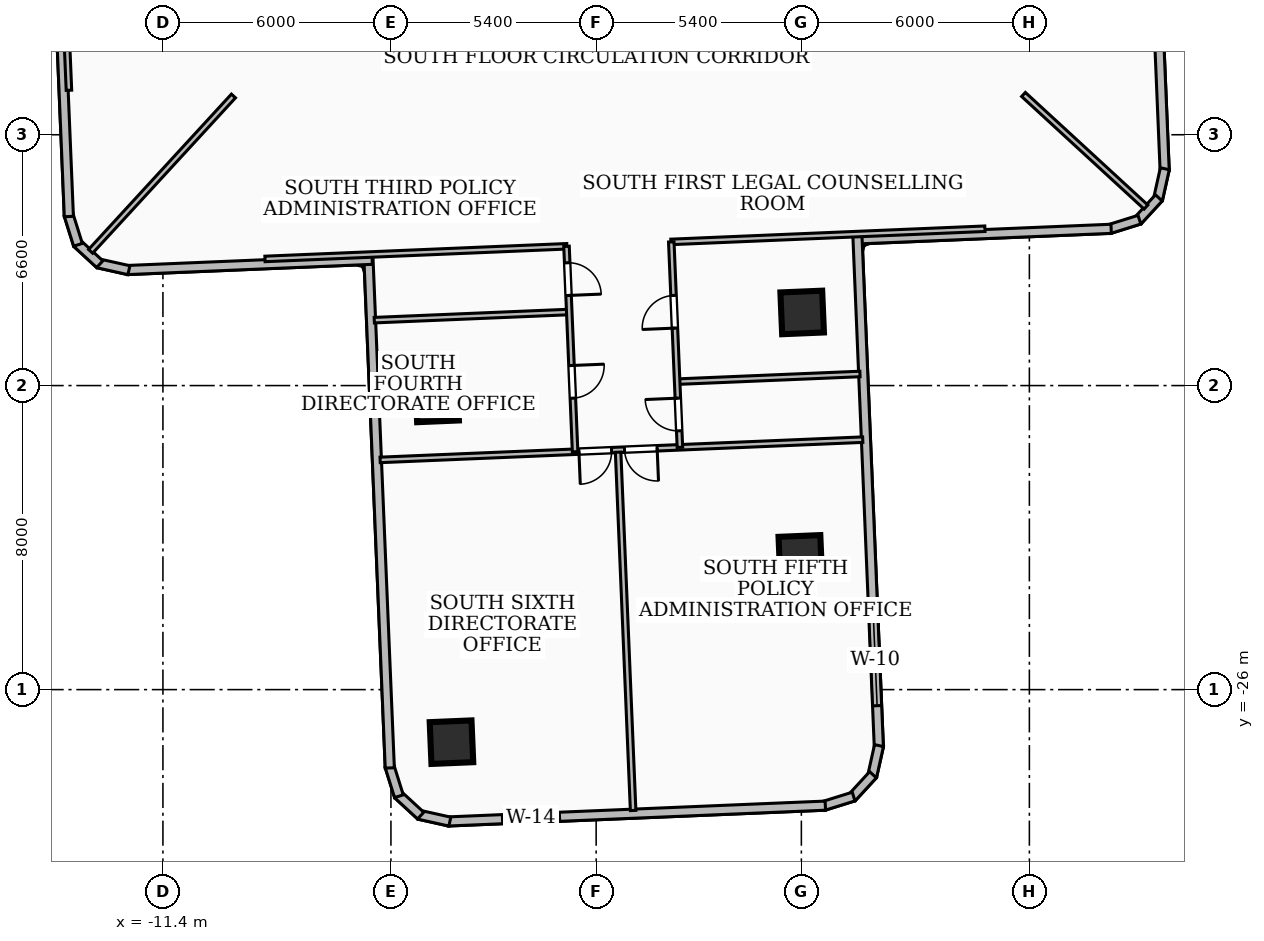
"""IFC4 building model, lengths in metres.
Left out: names, types, materials, properties, quantities, classifications, styles, units other than length and angle.
Written with IfcOpenShell. Run it as: python <this file> out.ifc"""

import sys

from ifc_helpers import new_model, si_unit, direction, frame, frame_2d, origin, origin_2d, place, context, subcontext, project, spatial, rectangle, extrude, element, fill, save


model = new_model("IFC4")
c1 = context("Model", 3, precision=1e-05, world=origin(), true_north=direction((0.0, 1.0)))
c2 = subcontext(c1, "Body", "Model", "MODEL_VIEW")
j1 = project(units=[si_unit("LENGTHUNIT", "METRE"), si_unit("PLANEANGLEUNIT", "RADIAN")], contexts=[c1])
p1 = place(None, origin())
s1 = spatial("IfcSite", under=j1, at=p1, CompositionType="ELEMENT")
p2 = place(p1, origin())
s2 = spatial("IfcBuilding", under=s1, at=p2, CompositionType="ELEMENT")
p3 = place(p2, frame((0.0, 0.0, 42.48)))
s3 = spatial("IfcBuildingStorey", under=s2, at=p3, CompositionType="ELEMENT", Elevation=42.48)
for number, where, z_axis, x_axis in (
    (1, (-4.184, -18.391, 0.0), (0.0, 0.0, 1.0), (0.999, 0.042, 0.0)),
    (2, (5.421, -16.076, 0.0), (0.0, 0.0, 1.0), (0.999, 0.042, 0.0)),
    (3, (-3.807, -27.383, 0.0), (0.0, 0.0, 1.0), (0.999, 0.042, 0.0)),
    (4, (5.372, -22.507, 0.0), (0.0, 0.0, 1.0), (0.999, 0.042, 0.0)),
):
    element("IfcColumn", number, at=place(p3, frame(where, z_axis=z_axis, x_axis=x_axis)), inside=s3, PredefinedType="COLUMN", context=c2, shape_type="SweptSolid", body=[
        extrude(rectangle(XDim=1.1, YDim=1.1, at=origin_2d()), origin(), (0.0, 0.0, 1.0), 3.6),
    ])
p4 = place(p3, frame((14.69, -5.894, 0.0), z_axis=(0.0, 0.0, 1.0), x_axis=(0.041827173477, -0.999124860845, 0.0)))
e5 = element("IfcWall", 5, at=p4, inside=s3, PredefinedType="SOLIDWALL", context=c2, shape_type="SweptSolid", body=[
    extrude(rectangle(XDim=6.456, YDim=0.24, at=frame_2d((3.228, 0.0))), origin(), (0.0, 0.0, 1.0), 3.34),
])
p5 = place(p3, frame((14.964, -12.295, 0.0), z_axis=(0.0, 0.0, 1.0), x_axis=(-0.21736704137, -0.976089939158, 0.0)))
e6 = element("IfcWall", 6, at=p5, inside=s3, PredefinedType="SOLIDWALL", context=c2, shape_type="SweptSolid", body=[
    extrude(rectangle(XDim=0.829, YDim=0.24, at=frame_2d((0.415, 0.0))), origin(), (0.0, 0.0, 1.0), 3.34),
])
p6 = place(p3, frame((14.806, -13.062, 0.0), z_axis=(0.0, 0.0, 1.0), x_axis=(-0.677693750404, -0.735344259965, 0.0)))
e7 = element("IfcWall", 7, at=p6, inside=s3, PredefinedType="SOLIDWALL", context=c2, shape_type="SweptSolid", body=[
    extrude(rectangle(XDim=0.813, YDim=0.24, at=frame_2d((0.406, 0.0))), origin(), (0.0, 0.0, 1.0), 3.34),
])
p7 = place(p3, frame((14.296, -13.635, 0.0), z_axis=(0.0, 0.0, 1.0), x_axis=(-0.954396284631, -0.298542680168, 0.0)))
e8 = element("IfcWall", 8, at=p7, inside=s3, PredefinedType="SOLIDWALL", context=c2, shape_type="SweptSolid", body=[
    extrude(rectangle(XDim=0.831, YDim=0.24, at=frame_2d((0.416, 0.0))), origin(), (0.0, 0.0, 1.0), 3.34),
])
p8 = place(p3, frame((13.552, -13.875, 0.0), z_axis=(0.0, 0.0, 1.0), x_axis=(-0.999127443157, -0.041765444226, 0.0)))
e9 = element("IfcWall", 9, at=p8, inside=s3, PredefinedType="SOLIDWALL", context=c2, shape_type="SweptSolid", body=[
    extrude(rectangle(XDim=6.775, YDim=0.24, at=frame_2d((3.387, 0.0))), origin(), (0.0, 0.0, 1.0), 3.34),
])
p9 = place(p3, frame((6.875, -14.058, 0.0), z_axis=(0.0, 0.0, 1.0), x_axis=(0.041850586852, -0.999123880397, 0.0)))
e10 = element("IfcWall", 10, at=p9, inside=s3, PredefinedType="SOLIDWALL", context=c2, shape_type="SweptSolid", body=[
    extrude(rectangle(XDim=13.476, YDim=0.24, at=frame_2d((6.738, 0.0))), origin(), (0.0, 0.0, 1.0), 3.34),
])
p10 = place(p9, frame((9.976, 0.0, 0.85)))
e11 = element("IfcOpeningElement", 11, at=p10, cuts=e10, PredefinedType="OPENING", context=c2, shape_type="SweptSolid", body=[
    extrude(rectangle(XDim=2.4, YDim=1.65, at=frame_2d((1.2, 0.825))), frame((0.0, 0.13, 0.0), z_axis=(0.0, -1.0, 0.0), x_axis=(1.0, 0.0, 0.0)), (0.0, 0.0, 1.0), 0.26),
])
p11 = place(p3, frame((7.443, -27.473, 0.0), z_axis=(0.0, 0.0, 1.0), x_axis=(-0.21736704137, -0.976089939158, 0.0)))
e12 = element("IfcWall", 12, at=p11, inside=s3, PredefinedType="SOLIDWALL", context=c2, shape_type="SweptSolid", body=[
    extrude(rectangle(XDim=0.829, YDim=0.24, at=frame_2d((0.415, 0.0))), origin(), (0.0, 0.0, 1.0), 3.34),
])
p12 = place(p3, frame((7.285, -28.24, 0.0), z_axis=(0.0, 0.0, 1.0), x_axis=(-0.676946063044, -0.73603262681, 0.0)))
e13 = element("IfcWall", 13, at=p12, inside=s3, PredefinedType="SOLIDWALL", context=c2, shape_type="SweptSolid", body=[
    extrude(rectangle(XDim=0.814, YDim=0.24, at=frame_2d((0.407, 0.0))), origin(), (0.0, 0.0, 1.0), 3.34),
])
p13 = place(p3, frame((6.775, -28.814, 0.0), z_axis=(0.0, 0.0, 1.0), x_axis=(-0.954730695464, -0.297471509794, 0.0)))
e14 = element("IfcWall", 14, at=p13, inside=s3, PredefinedType="SOLIDWALL", context=c2, shape_type="SweptSolid", body=[
    extrude(rectangle(XDim=0.831, YDim=0.24, at=frame_2d((0.415, 0.0))), origin(), (0.0, 0.0, 1.0), 3.34),
])
p14 = place(p3, frame((6.031, -29.053, 0.0), z_axis=(0.0, 0.0, 1.0), x_axis=(-0.999123553269, -0.041858395859, 0.0)))
e15 = element("IfcWall", 15, at=p14, inside=s3, PredefinedType="SOLIDWALL", context=c2, shape_type="SweptSolid", body=[
    extrude(rectangle(XDim=9.939, YDim=0.24, at=frame_2d((4.969, 0.0))), origin(), (0.0, 0.0, 1.0), 3.34),
])
p15 = place(p14, frame((7.002, 0.0, 0.85)))
e16 = element("IfcOpeningElement", 16, at=p15, cuts=e15, PredefinedType="OPENING", context=c2, shape_type="SweptSolid", body=[
    extrude(rectangle(XDim=1.5, YDim=1.5, at=frame_2d((0.75, 0.75))), frame((0.0, 0.13, 0.0), z_axis=(0.0, -1.0, 0.0), x_axis=(1.0, 0.0, 0.0)), (0.0, 0.0, 1.0), 0.26),
])
p16 = place(p3, frame((-3.85, -29.473, 0.0), z_axis=(0.0, 0.0, 1.0), x_axis=(-0.976138507006, 0.217148831773, 0.0)))
e17 = element("IfcWall", 17, at=p16, inside=s3, PredefinedType="SOLIDWALL", context=c2, shape_type="SweptSolid", body=[
    extrude(rectangle(XDim=0.829, YDim=0.24, at=frame_2d((0.414, 0.0))), origin(), (0.0, 0.0, 1.0), 3.34),
])
p17 = place(p3, frame((-4.617, -29.315, 0.0), z_axis=(0.0, 0.0, 1.0), x_axis=(-0.735482115769, 0.677544136853, 0.0)))
e18 = element("IfcWall", 18, at=p17, inside=s3, PredefinedType="SOLIDWALL", context=c2, shape_type="SweptSolid", body=[
    extrude(rectangle(XDim=0.813, YDim=0.24, at=frame_2d((0.407, 0.0))), origin(), (0.0, 0.0, 1.0), 3.34),
])
p18 = place(p3, frame((-5.19, -28.805, 0.0), z_axis=(0.0, 0.0, 1.0), x_axis=(-0.298542680168, 0.954396284631, 0.0)))
e19 = element("IfcWall", 19, at=p18, inside=s3, PredefinedType="SOLIDWALL", context=c2, shape_type="SweptSolid", body=[
    extrude(rectangle(XDim=0.831, YDim=0.24, at=frame_2d((0.416, 0.0))), origin(), (0.0, 0.0, 1.0), 3.34),
])
p19 = place(p3, frame((-5.43, -28.061, 0.0), z_axis=(0.0, 0.0, 1.0), x_axis=(-0.041852859621, 0.999123785195, 0.0)))
e20 = element("IfcWall", 20, at=p19, inside=s3, PredefinedType="SOLIDWALL", context=c2, shape_type="SweptSolid", body=[
    extrude(rectangle(XDim=13.475, YDim=0.24, at=frame_2d((6.737, 0.0))), origin(), (0.0, 0.0, 1.0), 2.421),
])
p20 = place(p3, frame((-5.894, -14.69, 0.0), z_axis=(0.0, 0.0, 1.0), x_axis=(-0.999124860845, -0.041827173477, 0.0)))
e21 = element("IfcWall", 21, at=p20, inside=s3, PredefinedType="SOLIDWALL", context=c2, shape_type="SweptSolid", body=[
    extrude(rectangle(XDim=6.456, YDim=0.24, at=frame_2d((3.228, 0.0))), origin(), (0.0, 0.0, 1.0), 2.421),
])
p21 = place(p3, frame((-12.295, -14.964, 0.0), z_axis=(0.0, 0.0, 1.0), x_axis=(-0.976089939158, 0.21736704137, 0.0)))
e22 = element("IfcWall", 22, at=p21, inside=s3, PredefinedType="SOLIDWALL", context=c2, shape_type="SweptSolid", body=[
    extrude(rectangle(XDim=0.829, YDim=0.24, at=frame_2d((0.415, 0.0))), origin(), (0.0, 0.0, 1.0), 3.34),
])
p22 = place(p3, frame((-13.062, -14.806, 0.0), z_axis=(0.0, 0.0, 1.0), x_axis=(-0.735344259965, 0.677693750404, 0.0)))
e23 = element("IfcWall", 23, at=p22, inside=s3, PredefinedType="SOLIDWALL", context=c2, shape_type="SweptSolid", body=[
    extrude(rectangle(XDim=0.813, YDim=0.24, at=frame_2d((0.406, 0.0))), origin(), (0.0, 0.0, 1.0), 3.34),
])
p23 = place(p3, frame((-13.635, -14.296, 0.0), z_axis=(0.0, 0.0, 1.0), x_axis=(-0.298542680168, 0.954396284631, 0.0)))
e24 = element("IfcWall", 24, at=p23, inside=s3, PredefinedType="SOLIDWALL", context=c2, shape_type="SweptSolid", body=[
    extrude(rectangle(XDim=0.831, YDim=0.24, at=frame_2d((0.416, 0.0))), origin(), (0.0, 0.0, 1.0), 3.34),
])
p24 = place(p3, frame((-13.875, -13.552, 0.0), z_axis=(0.0, 0.0, 1.0), x_axis=(-0.041765444226, 0.999127443157, 0.0)))
e25 = element("IfcWall", 25, at=p24, inside=s3, PredefinedType="SOLIDWALL", context=c2, shape_type="SweptSolid", body=[
    extrude(rectangle(XDim=6.775, YDim=0.24, at=frame_2d((3.387, 0.0))), origin(), (0.0, 0.0, 1.0), 3.34),
])
p25 = place(p3, frame((-9.544, -10.38, 0.0), z_axis=(0.0, 0.0, 1.0), x_axis=(-0.676856513188, -0.736114977809, 0.0)))
e26 = element("IfcWall", 26, at=p25, inside=s3, PredefinedType="PARTITIONING", context=c2, shape_type="SweptSolid", body=[
    extrude(rectangle(XDim=5.554, YDim=0.145, at=frame_2d((2.777, 0.0))), origin(), (0.0, 0.0, 1.0), 3.34),
])
p26 = place(p3, frame((11.245, -10.34, 0.0), z_axis=(0.0, 0.0, 1.0), x_axis=(0.736178820698, -0.676787074312, 0.0)))
e27 = element("IfcWall", 27, at=p26, inside=s3, PredefinedType="PARTITIONING", context=c2, shape_type="SweptSolid", body=[
    extrude(rectangle(XDim=4.378, YDim=0.145, at=frame_2d((2.189, 0.0))), origin(), (0.0, 0.0, 1.0), 3.34),
])
for number, where, z_axis, x_axis in (
    (28, (-14.22, -1.967, 0.0), (0.0, 0.0, 1.0), (0.042, -0.999, 0.0)),
    (29, (1.967, -14.22, 0.0), (0.0, 0.0, 1.0), (0.999, 0.042, 0.0)),
):
    element("IfcWall", number, at=place(p3, frame(where, z_axis=z_axis, x_axis=x_axis)), inside=s3, PredefinedType="PARTITIONING", context=c2, shape_type="SweptSolid", body=[
        extrude(rectangle(XDim=8.27, YDim=0.145, at=frame_2d((4.135, 0.0))), origin(), (0.0, 0.0, 1.0), 2.421),
    ])
p27 = place(p3, frame((-8.714, -14.668, 0.0), z_axis=(0.0, 0.0, 1.0), x_axis=(0.999122557945, 0.041882146625, 0.0)))
e30 = element("IfcWall", 30, at=p27, inside=s3, PredefinedType="PARTITIONING", context=c2, shape_type="SweptSolid", body=[
    extrude(rectangle(XDim=7.951, YDim=0.145, at=frame_2d((3.976, 0.0))), origin(), (0.0, 0.0, 1.0), 2.421),
])
p28 = place(p3, frame((2.151, -17.896, 0.0), z_axis=(0.0, 0.0, 1.0), x_axis=(0.999121741873, 0.041901609945, 0.0)))
e31 = element("IfcWall", 31, at=p28, inside=s3, PredefinedType="PARTITIONING", context=c2, shape_type="SweptSolid", body=[
    extrude(rectangle(XDim=4.795, YDim=0.145, at=frame_2d((2.397, 0.0))), origin(), (0.0, 0.0, 1.0), 2.421),
])
p29 = place(p3, frame((-5.838, -16.279, 0.0), z_axis=(0.0, 0.0, 1.0), x_axis=(0.999123283233, 0.041864840869, 0.0)))
e32 = element("IfcWall", 32, at=p29, inside=s3, PredefinedType="PARTITIONING", context=c2, shape_type="SweptSolid", body=[
    extrude(rectangle(XDim=5.114, YDim=0.145, at=frame_2d((2.557, 0.0))), origin(), (0.0, 0.0, 1.0), 2.421),
])
p30 = place(p3, frame((2.204, -19.625, 0.0), z_axis=(0.0, 0.0, 1.0), x_axis=(-0.041970303018, 0.999118858627, 0.0)))
e33 = element("IfcWall", 33, at=p30, inside=s3, PredefinedType="PARTITIONING", context=c2, shape_type="SweptSolid", body=[
    extrude(rectangle(XDim=5.41, YDim=0.145, at=frame_2d((2.705, 0.0))), origin(), (0.0, 0.0, 1.0), 3.34),
])
p31 = place(p30, frame((3.14, 0.0, 0.0)))
e34 = element("IfcOpeningElement", 34, at=p31, cuts=e33, PredefinedType="OPENING", context=c2, shape_type="SweptSolid", body=[
    extrude(rectangle(XDim=0.86, YDim=2.04, at=frame_2d((0.43, 1.02))), frame((0.0, 0.083, 0.0), z_axis=(0.0, -1.0, 0.0), x_axis=(1.0, 0.0, 0.0)), (0.0, 0.0, 1.0), 0.165),
])
p32 = place(p30, frame((0.435, 0.0, 0.0)))
e35 = element("IfcOpeningElement", 35, at=p32, cuts=e33, PredefinedType="OPENING", context=c2, shape_type="SweptSolid", body=[
    extrude(rectangle(XDim=0.86, YDim=2.04, at=frame_2d((0.43, 1.02))), frame((0.0, 0.083, 0.0), z_axis=(0.0, -1.0, 0.0), x_axis=(1.0, 0.0, 0.0)), (0.0, 0.0, 1.0), 0.165),
])
p33 = place(p3, frame((-0.78, -14.335, 0.0), z_axis=(0.0, 0.0, 1.0), x_axis=(0.041782565573, -0.999126727304, 0.0)))
e36 = element("IfcWall", 36, at=p33, inside=s3, PredefinedType="PARTITIONING", context=c2, shape_type="SweptSolid", body=[
    extrude(rectangle(XDim=5.411, YDim=0.145, at=frame_2d((2.705, 0.0))), origin(), (0.0, 0.0, 1.0), 3.34),
])
p34 = place(p33, frame((0.435, 0.0, 0.0)))
e37 = element("IfcOpeningElement", 37, at=p34, cuts=e36, PredefinedType="OPENING", context=c2, shape_type="SweptSolid", body=[
    extrude(rectangle(XDim=0.86, YDim=2.04, at=frame_2d((0.43, 1.02))), frame((0.0, 0.083, 0.0), z_axis=(0.0, -1.0, 0.0), x_axis=(1.0, 0.0, 0.0)), (0.0, 0.0, 1.0), 0.165),
])
p35 = place(p33, frame((3.14, 0.0, 0.0)))
e38 = element("IfcOpeningElement", 38, at=p35, cuts=e36, PredefinedType="OPENING", context=c2, shape_type="SweptSolid", body=[
    extrude(rectangle(XDim=0.86, YDim=2.04, at=frame_2d((0.43, 1.02))), frame((0.0, 0.083, 0.0), z_axis=(0.0, -1.0, 0.0), x_axis=(1.0, 0.0, 0.0)), (0.0, 0.0, 1.0), 0.165),
])
p36 = place(p3, frame((0.578, -19.753, 0.0), z_axis=(0.0, 0.0, 1.0), x_axis=(0.041866246522, -0.999123224333, 0.0)))
e39 = element("IfcWall", 39, at=p36, inside=s3, PredefinedType="PARTITIONING", context=c2, shape_type="SweptSolid", body=[
    extrude(rectangle(XDim=9.435, YDim=0.145, at=frame_2d((4.718, 0.0))), origin(), (0.0, 0.0, 1.0), 2.832),
])
p37 = place(p3, frame((7.015, -19.423, 0.0), z_axis=(0.0, 0.0, 1.0), x_axis=(-0.99912047737, -0.041931750497, 0.0)))
e40 = element("IfcWall", 40, at=p37, inside=s3, PredefinedType="PARTITIONING", context=c2, shape_type="SweptSolid", body=[
    extrude(rectangle(XDim=12.71, YDim=0.145, at=frame_2d((6.355, 0.0))), origin(), (0.0, 0.0, 1.0), 2.421),
])
p38 = place(p37, frame((6.615, 0.0, 0.0)))
e41 = element("IfcOpeningElement", 41, at=p38, cuts=e40, PredefinedType="OPENING", context=c2, shape_type="SweptSolid", body=[
    extrude(rectangle(XDim=0.86, YDim=2.04, at=frame_2d((0.43, 1.02))), frame((0.0, 0.083, 0.0), z_axis=(0.0, -1.0, 0.0), x_axis=(1.0, 0.0, 0.0)), (0.0, 0.0, 1.0), 0.165),
])
p39 = place(p37, frame((5.415, 0.0, 0.0)))
e42 = element("IfcOpeningElement", 42, at=p39, cuts=e40, PredefinedType="OPENING", context=c2, shape_type="SweptSolid", body=[
    extrude(rectangle(XDim=0.86, YDim=2.04, at=frame_2d((0.43, 1.02))), frame((0.0, 0.083, 0.0), z_axis=(0.0, -1.0, 0.0), x_axis=(1.0, 0.0, 0.0)), (0.0, 0.0, 1.0), 0.165),
])
p40 = place(p10, origin())
e43 = element("IfcWindow", 43, at=p40, inside=s3, PartitioningType="SINGLE_PANEL", PredefinedType="WINDOW", context=c2, shape_type="SweptSolid", body=[
    extrude(rectangle(XDim=2.4, YDim=1.65, at=frame_2d((1.2, 0.825))), frame((0.0, 0.03, 0.0), z_axis=(0.0, -1.0, 0.0), x_axis=(1.0, 0.0, 0.0)), (0.0, 0.0, 1.0), 0.06),
])
fill(e11, e43)
p41 = place(p15, origin())
e44 = element("IfcWindow", 44, at=p41, inside=s3, PartitioningType="SINGLE_PANEL", PredefinedType="WINDOW", context=c2, shape_type="SweptSolid", body=[
    extrude(rectangle(XDim=1.5, YDim=1.5, at=frame_2d((0.75, 0.75))), frame((0.0, 0.03, 0.0), z_axis=(0.0, -1.0, 0.0), x_axis=(1.0, 0.0, 0.0)), (0.0, 0.0, 1.0), 0.06),
])
fill(e16, e44)
p42 = place(p31, origin())
e45 = element("IfcDoor", 45, at=p42, inside=s3, OperationType="SINGLE_SWING_LEFT", PredefinedType="DOOR", context=c2, shape_type="SweptSolid", body=[
    extrude(rectangle(XDim=0.86, YDim=2.04, at=frame_2d((0.43, 1.02))), frame((0.0, 0.025, 0.0), z_axis=(0.0, -1.0, 0.0), x_axis=(1.0, 0.0, 0.0)), (0.0, 0.0, 1.0), 0.05),
])
fill(e34, e45)
p43 = place(p32, origin())
e46 = element("IfcDoor", 46, at=p43, inside=s3, OperationType="SINGLE_SWING_RIGHT", PredefinedType="DOOR", context=c2, shape_type="SweptSolid", body=[
    extrude(rectangle(XDim=0.86, YDim=2.04, at=frame_2d((0.43, 1.02))), frame((0.0, 0.025, 0.0), z_axis=(0.0, -1.0, 0.0), x_axis=(1.0, 0.0, 0.0)), (0.0, 0.0, 1.0), 0.05),
])
fill(e35, e46)
p44 = place(p34, origin())
e47 = element("IfcDoor", 47, at=p44, inside=s3, OperationType="SINGLE_SWING_RIGHT", PredefinedType="DOOR", context=c2, shape_type="SweptSolid", body=[
    extrude(rectangle(XDim=0.86, YDim=2.04, at=frame_2d((0.43, 1.02))), frame((0.0, 0.025, 0.0), z_axis=(0.0, -1.0, 0.0), x_axis=(1.0, 0.0, 0.0)), (0.0, 0.0, 1.0), 0.05),
])
fill(e37, e47)
p45 = place(p35, origin())
e48 = element("IfcDoor", 48, at=p45, inside=s3, OperationType="SINGLE_SWING_LEFT", PredefinedType="DOOR", context=c2, shape_type="SweptSolid", body=[
    extrude(rectangle(XDim=0.86, YDim=2.04, at=frame_2d((0.43, 1.02))), frame((0.0, 0.025, 0.0), z_axis=(0.0, -1.0, 0.0), x_axis=(1.0, 0.0, 0.0)), (0.0, 0.0, 1.0), 0.05),
])
fill(e38, e48)
p46 = place(p38, origin())
e49 = element("IfcDoor", 49, at=p46, inside=s3, OperationType="SINGLE_SWING_RIGHT", PredefinedType="DOOR", context=c2, shape_type="SweptSolid", body=[
    extrude(rectangle(XDim=0.86, YDim=2.04, at=frame_2d((0.43, 1.02))), frame((0.0, 0.025, 0.0), z_axis=(0.0, -1.0, 0.0), x_axis=(1.0, 0.0, 0.0)), (0.0, 0.0, 1.0), 0.05),
])
fill(e41, e49)
p47 = place(p39, origin())
e50 = element("IfcDoor", 50, at=p47, inside=s3, OperationType="SINGLE_SWING_LEFT", PredefinedType="DOOR", context=c2, shape_type="SweptSolid", body=[
    extrude(rectangle(XDim=0.86, YDim=2.04, at=frame_2d((0.43, 1.02))), frame((0.0, 0.025, 0.0), z_axis=(0.0, -1.0, 0.0), x_axis=(1.0, 0.0, 0.0)), (0.0, 0.0, 1.0), 0.05),
])
fill(e42, e50)
save(model, sys.argv[1])
